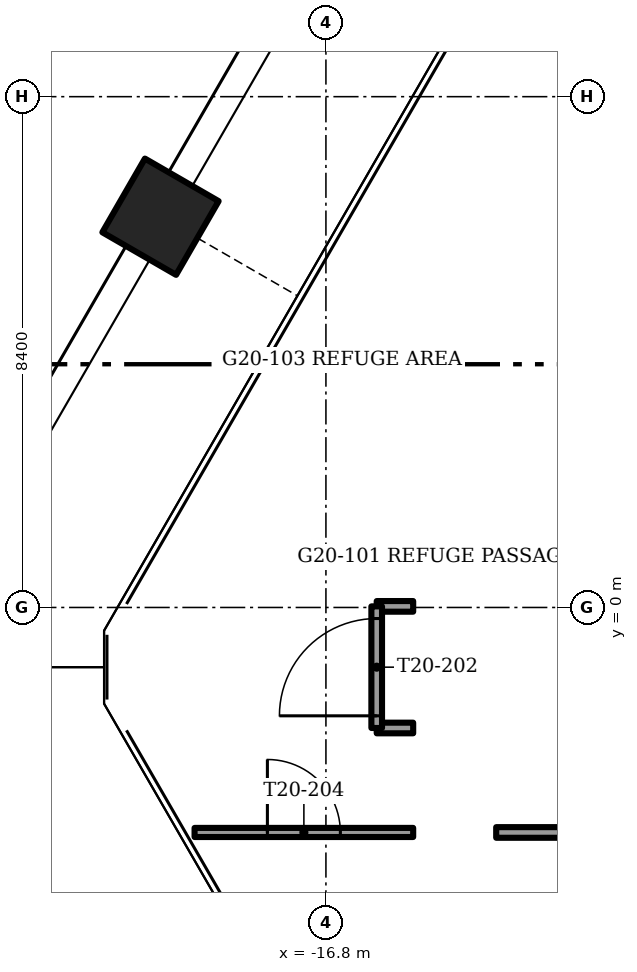
"""IFC4 building model, lengths in metres.
Left out: names, types, materials, properties, quantities, classifications, styles, units other than length and angle.
Written with IfcOpenShell. Run it as: python <this file> out.ifc"""

import sys

from ifc_helpers import new_model, si_unit, direction, frame, frame_2d, origin, origin_2d, place, context, subcontext, project, spatial, rectangle, extrude, element, fill, save


model = new_model("IFC4")
c1 = context("Model", 3, precision=1e-05, world=origin(), true_north=direction((0.0, 1.0)))
c2 = subcontext(c1, "Body", "Model", "MODEL_VIEW")
j1 = project(units=[si_unit("LENGTHUNIT", "METRE"), si_unit("PLANEANGLEUNIT", "RADIAN")], contexts=[c1])
p1 = place(None, origin())
s1 = spatial("IfcSite", under=j1, at=p1, CompositionType="ELEMENT")
p2 = place(p1, origin())
s2 = spatial("IfcBuilding", under=s1, at=p2, CompositionType="ELEMENT")
p3 = place(p2, frame((0.0, 0.0, 80.5)))
s3 = spatial("IfcBuildingStorey", under=s2, at=p3, CompositionType="ELEMENT", Elevation=80.5)
p4 = place(p3, frame((-19.521, 6.426, -1.2), z_axis=(0.0, 0.0, 1.0), x_axis=(0.5, 0.866025403784, 0.0)))
e1 = element("IfcColumn", 1, at=p4, inside=s3, PredefinedType="COLUMN", context=c2, shape_type="SweptSolid", body=[
    extrude(rectangle(XDim=1.4, YDim=1.4, at=origin_2d()), origin(), (0.0, 0.0, 1.0), 5.0),
])
p5 = place(p3, frame((-14.0, -3.7, 0.0), z_axis=(0.0, 0.0, 1.0), x_axis=(1.0, 0.0, 0.0)))
e2 = element("IfcWall", 2, at=p5, inside=s3, PredefinedType="PARTITIONING", context=c2, shape_type="SweptSolid", body=[
    extrude(rectangle(XDim=4.62, YDim=0.175, at=frame_2d((2.31, 0.0))), origin(), (0.0, 0.0, 1.0), 4.7),
])
p6 = place(p5, frame((1.71, 0.0, 0.0)))
e3 = element("IfcOpeningElement", 3, at=p6, cuts=e2, PredefinedType="OPENING", context=c2, shape_type="SweptSolid", body=[
    extrude(rectangle(XDim=1.2, YDim=2.1, at=frame_2d((0.6, 1.05))), frame((0.0, 0.087, 0.0), z_axis=(0.0, -1.0, 0.0), x_axis=(1.0, 0.0, 0.0)), (0.0, 0.0, 1.0), 0.175),
])
for number, where, z_axis, x_axis in (
    (4, (-15.965, -1.982, 0.0), (0.0, 0.0, 1.0), (1.0, 0.0, 0.0)),
    (5, (-15.965, 0.018, 0.0), (0.0, 0.0, 1.0), (1.0, 0.0, 0.0)),
):
    element("IfcWall", number, at=place(p3, frame(where, z_axis=z_axis, x_axis=x_axis)), inside=s3, PredefinedType="PARTITIONING", context=c2, shape_type="SweptSolid", body=[
        extrude(rectangle(XDim=0.6, YDim=0.175, at=frame_2d((0.3, 0.0))), origin(), (0.0, 0.0, 1.0), 4.7),
    ])
p7 = place(p3, frame((-15.965, -1.982, 0.0), z_axis=(0.0, 0.0, 1.0), x_axis=(0.0, 1.0, 0.0)))
e6 = element("IfcWall", 6, at=p7, inside=s3, PredefinedType="PARTITIONING", context=c2, shape_type="SweptSolid", body=[
    extrude(rectangle(XDim=2.0, YDim=0.175, at=frame_2d((1.0, 0.0))), origin(), (0.0, 0.0, 1.0), 4.7),
])
p8 = place(p7, frame((0.2, 0.0, 0.0)))
e7 = element("IfcOpeningElement", 7, at=p8, cuts=e6, PredefinedType="OPENING", context=c2, shape_type="SweptSolid", body=[
    extrude(rectangle(XDim=1.6, YDim=2.1, at=frame_2d((0.8, 1.05))), frame((0.0, 0.087, 0.0), z_axis=(0.0, -1.0, 0.0), x_axis=(1.0, 0.0, 0.0)), (0.0, 0.0, 1.0), 0.175),
])
p9 = place(p3, frame((-18.96, -3.7, 0.0), z_axis=(0.0, 0.0, 1.0), x_axis=(1.0, 0.0, 0.0)))
e8 = element("IfcWall", 8, at=p9, inside=s3, PredefinedType="PARTITIONING", context=c2, shape_type="SweptSolid", body=[
    extrude(rectangle(XDim=3.595, YDim=0.15, at=frame_2d((1.798, 0.0))), origin(), (0.0, 0.0, 1.0), 4.7),
])
p10 = place(p9, frame((1.198, 0.0, 0.0)))
e9 = element("IfcOpeningElement", 9, at=p10, cuts=e8, PredefinedType="OPENING", context=c2, shape_type="SweptSolid", body=[
    extrude(rectangle(XDim=1.2, YDim=2.1, at=frame_2d((0.6, 1.05))), frame((0.0, 0.075, 0.0), z_axis=(0.0, -1.0, 0.0), x_axis=(1.0, 0.0, 0.0)), (0.0, 0.0, 1.0), 0.15),
])
p11 = place(p8, origin())
e10 = element("IfcDoor", 10, at=p11, inside=s3, OperationType="DOUBLE_DOOR_SINGLE_SWING", PredefinedType="DOOR", context=c2, shape_type="SweptSolid", body=[
    extrude(rectangle(XDim=1.6, YDim=2.1, at=frame_2d((0.8, 1.05))), frame((0.0, 0.025, 0.0), z_axis=(0.0, -1.0, 0.0), x_axis=(1.0, 0.0, 0.0)), (0.0, 0.0, 1.0), 0.05),
])
fill(e7, e10)
p12 = place(p10, origin())
e11 = element("IfcDoor", 11, at=p12, inside=s3, OperationType="SINGLE_SWING_RIGHT", PredefinedType="DOOR", context=c2, shape_type="SweptSolid", body=[
    extrude(rectangle(XDim=1.2, YDim=2.1, at=frame_2d((0.6, 1.05))), frame((0.0, 0.025, 0.0), z_axis=(0.0, -1.0, 0.0), x_axis=(1.0, 0.0, 0.0)), (0.0, 0.0, 1.0), 0.05),
])
fill(e9, e11)
save(model, sys.argv[1])
